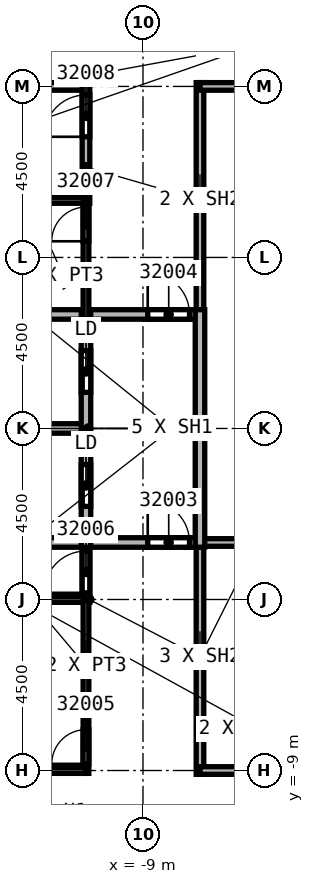
"""IFC4 building model, lengths in metres.
Left out: names, types, materials, properties, quantities, classifications, styles, units other than length and angle.
Written with IfcOpenShell. Run it as: python <this file> out.ifc"""

import sys

from ifc_helpers import new_model, si_unit, direction, frame, frame_2d, origin, place, context, subcontext, project, spatial, rectangle, extrude, element, fill, save


model = new_model("IFC4")
c1 = context("Model", 3, precision=1e-05, world=origin(), true_north=direction((0.0, 1.0)))
c2 = subcontext(c1, "Body", "Model", "MODEL_VIEW")
j1 = project(units=[si_unit("LENGTHUNIT", "METRE"), si_unit("PLANEANGLEUNIT", "RADIAN")], contexts=[c1])
p1 = place(None, origin())
s1 = spatial("IfcSite", under=j1, at=p1, CompositionType="ELEMENT")
p2 = place(p1, origin())
s2 = spatial("IfcBuilding", under=s1, at=p2, CompositionType="ELEMENT")
p3 = place(p2, frame((0.0, 0.0, 356.0)))
s3 = spatial("IfcBuildingStorey", under=s2, at=p3, CompositionType="ELEMENT", Elevation=356.0)
p4 = place(p3, frame((-13.5, 9.0, 0.0), z_axis=(0.0, 0.0, 1.0), x_axis=(1.0, 0.0, 0.0)))
e1 = element("IfcWall", 1, at=p4, inside=s3, PredefinedType="SOLIDWALL", context=c2, shape_type="SweptSolid", body=[
    extrude(rectangle(XDim=3.0, YDim=0.2, at=frame_2d((1.5, 0.0))), origin(), (0.0, 0.0, 1.0), 3.838),
])
p5 = place(p3, frame((-10.5, -4.575, 0.0), z_axis=(0.0, 0.0, 1.0), x_axis=(0.0, 1.0, 0.0)))
e2 = element("IfcWall", 2, at=p5, inside=s3, PredefinedType="SOLIDWALL", context=c2, shape_type="SweptSolid", body=[
    extrude(rectangle(XDim=1.7, YDim=0.2, at=frame_2d((0.85, 0.0))), origin(), (0.0, 0.0, 1.0), 4.15),
])
p6 = place(p5, frame((0.25, 0.0, 0.0)))
e3 = element("IfcOpeningElement", 3, at=p6, cuts=e2, PredefinedType="OPENING", context=c2, shape_type="SweptSolid", body=[
    extrude(rectangle(XDim=1.1, YDim=2.1, at=frame_2d((0.55, 1.05))), frame((0.0, 0.1, 0.0), z_axis=(0.0, -1.0, 0.0), x_axis=(1.0, 0.0, 0.0)), (0.0, 0.0, 1.0), 0.2),
])
p7 = place(p3, frame((-10.5, 5.925, 0.0), z_axis=(0.0, 0.0, 1.0), x_axis=(0.0, 1.0, 0.0)))
e4 = element("IfcWall", 4, at=p7, inside=s3, PredefinedType="SOLIDWALL", context=c2, shape_type="SweptSolid", body=[
    extrude(rectangle(XDim=3.175, YDim=0.2, at=frame_2d((1.587, 0.0))), origin(), (0.0, 0.0, 1.0), 4.15),
])
p8 = place(p7, frame((1.75, 0.0, 0.0)))
e5 = element("IfcOpeningElement", 5, at=p8, cuts=e4, PredefinedType="OPENING", context=c2, shape_type="SweptSolid", body=[
    extrude(rectangle(XDim=1.1, YDim=2.1, at=frame_2d((0.55, 1.05))), frame((0.0, 0.1, 0.0), z_axis=(0.0, -1.0, 0.0), x_axis=(1.0, 0.0, 0.0)), (0.0, 0.0, 1.0), 0.2),
])
p9 = place(p3, frame((-7.625, -3.0, 0.0), z_axis=(0.0, 0.0, 1.0), x_axis=(1.0, 0.0, 0.0)))
e6 = element("IfcWall", 6, at=p9, inside=s3, PredefinedType="SOLIDWALL", context=c2, shape_type="SweptSolid", body=[
    extrude(rectangle(XDim=3.225, YDim=0.2, at=frame_2d((1.613, 0.0))), origin(), (0.0, 0.0, 1.0), 4.15),
])
for number, where, z_axis, x_axis in (
    (7, (-7.5, -9.1, 0.0), (0.0, 0.0, 1.0), (0.0, 1.0, 0.0)),
    (8, (-7.5, 2.875, 0.0), (0.0, 0.0, 1.0), (0.0, 1.0, 0.0)),
):
    element("IfcWall", number, at=place(p3, frame(where, z_axis=z_axis, x_axis=x_axis)), inside=s3, PredefinedType="SOLIDWALL", context=c2, shape_type="SweptSolid", body=[
        extrude(rectangle(XDim=6.225, YDim=0.2, at=frame_2d((3.113, 0.0))), origin(), (0.0, 0.0, 1.0), 4.15),
    ])
for number, where, z_axis, x_axis in (
    (9, (-7.5, 9.0, 0.0), (0.0, 0.0, 1.0), (1.0, 0.0, 0.0)),
    (10, (-4.5, -9.0, 0.0), (0.0, 0.0, 1.0), (-1.0, 0.0, 0.0)),
):
    element("IfcWall", number, at=place(p3, frame(where, z_axis=z_axis, x_axis=x_axis)), inside=s3, PredefinedType="SOLIDWALL", context=c2, shape_type="SweptSolid", body=[
        extrude(rectangle(XDim=3.0, YDim=0.2, at=frame_2d((1.5, 0.0))), origin(), (0.0, 0.0, 1.0), 3.838),
    ])
p10 = place(p3, frame((-13.625, 0.0, 0.0), z_axis=(0.0, 0.0, 1.0), x_axis=(1.0, 0.0, 0.0)))
e11 = element("IfcWall", 11, at=p10, inside=s3, PredefinedType="SOLIDWALL", context=c2, shape_type="SweptSolid", body=[
    extrude(rectangle(XDim=3.125, YDim=0.25, at=frame_2d((1.562, 0.0))), origin(), (0.0, 0.0, 1.0), 4.15),
])
p11 = place(p3, frame((-13.625, 3.0, 0.0), z_axis=(0.0, 0.0, 1.0), x_axis=(1.0, 0.0, 0.0)))
e12 = element("IfcWall", 12, at=p11, inside=s3, PredefinedType="SOLIDWALL", context=c2, shape_type="SweptSolid", body=[
    extrude(rectangle(XDim=6.125, YDim=0.25, at=frame_2d((3.062, 0.0))), origin(), (0.0, 0.0, 1.0), 4.15),
])
p12 = place(p11, frame((4.75, 0.0, 0.0)))
e13 = element("IfcOpeningElement", 13, at=p12, cuts=e12, PredefinedType="OPENING", context=c2, shape_type="SweptSolid", body=[
    extrude(rectangle(XDim=1.1, YDim=2.1, at=frame_2d((0.55, 1.05))), frame((0.0, 0.125, 0.0), z_axis=(0.0, -1.0, 0.0), x_axis=(1.0, 0.0, 0.0)), (0.0, 0.0, 1.0), 0.25),
])
p13 = place(p3, frame((-13.625, -3.0, 0.0), z_axis=(0.0, 0.0, 1.0), x_axis=(1.0, 0.0, 0.0)))
e14 = element("IfcWall", 14, at=p13, inside=s3, PredefinedType="SOLIDWALL", context=c2, shape_type="SweptSolid", body=[
    extrude(rectangle(XDim=6.125, YDim=0.25, at=frame_2d((3.062, 0.0))), origin(), (0.0, 0.0, 1.0), 4.15),
])
p14 = place(p13, frame((4.75, 0.0, 0.0)))
e15 = element("IfcOpeningElement", 15, at=p14, cuts=e14, PredefinedType="OPENING", context=c2, shape_type="SweptSolid", body=[
    extrude(rectangle(XDim=1.1, YDim=2.1, at=frame_2d((0.55, 1.05))), frame((0.0, 0.125, 0.0), z_axis=(0.0, -1.0, 0.0), x_axis=(1.0, 0.0, 0.0)), (0.0, 0.0, 1.0), 0.25),
])
p15 = place(p3, frame((-10.5, -3.125, 0.0), z_axis=(0.0, 0.0, 1.0), x_axis=(0.0, 1.0, 0.0)))
e16 = element("IfcWall", 16, at=p15, inside=s3, PredefinedType="SOLIDWALL", context=c2, shape_type="SweptSolid", body=[
    extrude(rectangle(XDim=6.25, YDim=0.25, at=frame_2d((3.125, 0.0))), origin(), (0.0, 0.0, 1.0), 4.15),
])
p16 = place(p15, frame((1.075, 0.0, 0.0)))
e17 = element("IfcOpeningElement", 17, at=p16, cuts=e16, PredefinedType="OPENING", context=c2, shape_type="SweptSolid", body=[
    extrude(rectangle(XDim=1.1, YDim=2.1, at=frame_2d((0.55, 1.05))), frame((0.0, 0.125, 0.0), z_axis=(0.0, -1.0, 0.0), x_axis=(1.0, 0.0, 0.0)), (0.0, 0.0, 1.0), 0.25),
])
p17 = place(p15, frame((4.075, 0.0, 0.0)))
e18 = element("IfcOpeningElement", 18, at=p17, cuts=e16, PredefinedType="OPENING", context=c2, shape_type="SweptSolid", body=[
    extrude(rectangle(XDim=1.1, YDim=2.1, at=frame_2d((0.55, 1.05))), frame((0.0, 0.125, 0.0), z_axis=(0.0, -1.0, 0.0), x_axis=(1.0, 0.0, 0.0)), (0.0, 0.0, 1.0), 0.25),
])
p18 = place(p3, frame((-7.5, -3.125, 0.0), z_axis=(0.0, 0.0, 1.0), x_axis=(0.0, 1.0, 0.0)))
e19 = element("IfcWall", 19, at=p18, inside=s3, PredefinedType="SOLIDWALL", context=c2, shape_type="SweptSolid", body=[
    extrude(rectangle(XDim=6.25, YDim=0.25, at=frame_2d((3.125, 0.0))), origin(), (0.0, 0.0, 1.0), 4.15),
])
for number, where, z_axis, x_axis in (
    (20, (-13.6, -4.5, 0.0), (0.0, 0.0, 1.0), (1.0, 0.0, 0.0)),
    (21, (-13.6, 6.0, 0.0), (0.0, 0.0, 1.0), (1.0, 0.0, 0.0)),
):
    element("IfcWall", number, at=place(p3, frame(where, z_axis=z_axis, x_axis=x_axis)), inside=s3, PredefinedType="PARTITIONING", context=c2, shape_type="SweptSolid", body=[
        extrude(rectangle(XDim=3.1, YDim=0.15, at=frame_2d((1.55, 0.0))), origin(), (0.0, 0.0, 1.0), 4.15),
    ])
p19 = place(p3, frame((-10.5, -9.075, 0.0), z_axis=(0.0, 0.0, 1.0), x_axis=(0.0, 1.0, 0.0)))
e22 = element("IfcWall", 22, at=p19, inside=s3, PredefinedType="PARTITIONING", context=c2, shape_type="SweptSolid", body=[
    extrude(rectangle(XDim=4.65, YDim=0.15, at=frame_2d((2.325, 0.0))), origin(), (0.0, 0.0, 1.0), 4.15),
])
p20 = place(p19, frame((0.25, 0.0, 0.0)))
e23 = element("IfcOpeningElement", 23, at=p20, cuts=e22, PredefinedType="OPENING", context=c2, shape_type="SweptSolid", body=[
    extrude(rectangle(XDim=0.9, YDim=2.1, at=frame_2d((0.45, 1.05))), frame((0.0, 0.075, 0.0), z_axis=(0.0, -1.0, 0.0), x_axis=(1.0, 0.0, 0.0)), (0.0, 0.0, 1.0), 0.15),
])
p21 = place(p3, frame((-10.5, -9.0, 0.0), z_axis=(0.0, 0.0, 1.0), x_axis=(-1.0, 0.0, 0.0)))
e24 = element("IfcWall", 24, at=p21, inside=s3, PredefinedType="PARTITIONING", context=c2, shape_type="SweptSolid", body=[
    extrude(rectangle(XDim=3.0, YDim=0.15, at=frame_2d((1.5, 0.0))), origin(), (0.0, 0.0, 1.0), 3.838),
])
p22 = place(p3, frame((-10.5, 2.875, 0.0), z_axis=(0.0, 0.0, 1.0), x_axis=(0.0, 1.0, 0.0)))
e25 = element("IfcWall", 25, at=p22, inside=s3, PredefinedType="PARTITIONING", context=c2, shape_type="SweptSolid", body=[
    extrude(rectangle(XDim=3.2, YDim=0.15, at=frame_2d((1.6, 0.0))), origin(), (0.0, 0.0, 1.0), 4.15),
])
p23 = place(p22, frame((2.05, 0.0, 0.0)))
e26 = element("IfcOpeningElement", 26, at=p23, cuts=e25, PredefinedType="OPENING", context=c2, shape_type="SweptSolid", body=[
    extrude(rectangle(XDim=0.9, YDim=2.1, at=frame_2d((0.45, 1.05))), frame((0.0, 0.075, 0.0), z_axis=(0.0, -1.0, 0.0), x_axis=(1.0, 0.0, 0.0)), (0.0, 0.0, 1.0), 0.15),
])
p24 = place(p14, origin())
e27 = element("IfcDoor", 27, at=p24, inside=s3, OperationType="SINGLE_SWING_RIGHT", PredefinedType="DOOR", context=c2, shape_type="SweptSolid", body=[
    extrude(rectangle(XDim=1.1, YDim=2.1, at=frame_2d((0.55, 1.05))), frame((0.0, 0.025, 0.0), z_axis=(0.0, -1.0, 0.0), x_axis=(1.0, 0.0, 0.0)), (0.0, 0.0, 1.0), 0.05),
])
fill(e15, e27)
p25 = place(p12, origin())
e28 = element("IfcDoor", 28, at=p25, inside=s3, OperationType="SINGLE_SWING_LEFT", PredefinedType="DOOR", context=c2, shape_type="SweptSolid", body=[
    extrude(rectangle(XDim=1.1, YDim=2.1, at=frame_2d((0.55, 1.05))), frame((0.0, 0.025, 0.0), z_axis=(0.0, -1.0, 0.0), x_axis=(1.0, 0.0, 0.0)), (0.0, 0.0, 1.0), 0.05),
])
fill(e13, e28)
p26 = place(p20, origin())
e29 = element("IfcDoor", 29, at=p26, inside=s3, OperationType="SINGLE_SWING_RIGHT", PredefinedType="DOOR", context=c2, shape_type="SweptSolid", body=[
    extrude(rectangle(XDim=0.9, YDim=2.1, at=frame_2d((0.45, 1.05))), frame((0.0, 0.025, 0.0), z_axis=(0.0, -1.0, 0.0), x_axis=(1.0, 0.0, 0.0)), (0.0, 0.0, 1.0), 0.05),
])
fill(e23, e29)
p27 = place(p6, origin())
e30 = element("IfcDoor", 30, at=p27, inside=s3, OperationType="SINGLE_SWING_LEFT", PredefinedType="DOOR", context=c2, shape_type="SweptSolid", body=[
    extrude(rectangle(XDim=1.1, YDim=2.1, at=frame_2d((0.55, 1.05))), frame((0.0, 0.025, 0.0), z_axis=(0.0, -1.0, 0.0), x_axis=(1.0, 0.0, 0.0)), (0.0, 0.0, 1.0), 0.05),
])
fill(e3, e30)
p28 = place(p23, origin())
e31 = element("IfcDoor", 31, at=p28, inside=s3, OperationType="SINGLE_SWING_RIGHT", PredefinedType="DOOR", context=c2, shape_type="SweptSolid", body=[
    extrude(rectangle(XDim=0.9, YDim=2.1, at=frame_2d((0.45, 1.05))), frame((0.0, 0.025, 0.0), z_axis=(0.0, -1.0, 0.0), x_axis=(1.0, 0.0, 0.0)), (0.0, 0.0, 1.0), 0.05),
])
fill(e26, e31)
p29 = place(p8, origin())
e32 = element("IfcDoor", 32, at=p29, inside=s3, OperationType="SINGLE_SWING_LEFT", PredefinedType="DOOR", context=c2, shape_type="SweptSolid", body=[
    extrude(rectangle(XDim=1.1, YDim=2.1, at=frame_2d((0.55, 1.05))), frame((0.0, 0.025, 0.0), z_axis=(0.0, -1.0, 0.0), x_axis=(1.0, 0.0, 0.0)), (0.0, 0.0, 1.0), 0.05),
])
fill(e5, e32)
p30 = place(p16, origin())
e33 = element("IfcDoor", 33, at=p30, inside=s3, OperationType="SLIDING_TO_LEFT", PredefinedType="DOOR", context=c2, shape_type="SweptSolid", body=[
    extrude(rectangle(XDim=1.1, YDim=2.1, at=frame_2d((0.55, 1.05))), frame((0.0, 0.025, 0.0), z_axis=(0.0, -1.0, 0.0), x_axis=(1.0, 0.0, 0.0)), (0.0, 0.0, 1.0), 0.05),
])
fill(e17, e33)
p31 = place(p17, origin())
e34 = element("IfcDoor", 34, at=p31, inside=s3, OperationType="SLIDING_TO_LEFT", PredefinedType="DOOR", context=c2, shape_type="SweptSolid", body=[
    extrude(rectangle(XDim=1.1, YDim=2.1, at=frame_2d((0.55, 1.05))), frame((0.0, 0.025, 0.0), z_axis=(0.0, -1.0, 0.0), x_axis=(1.0, 0.0, 0.0)), (0.0, 0.0, 1.0), 0.05),
])
fill(e18, e34)
save(model, sys.argv[1])
